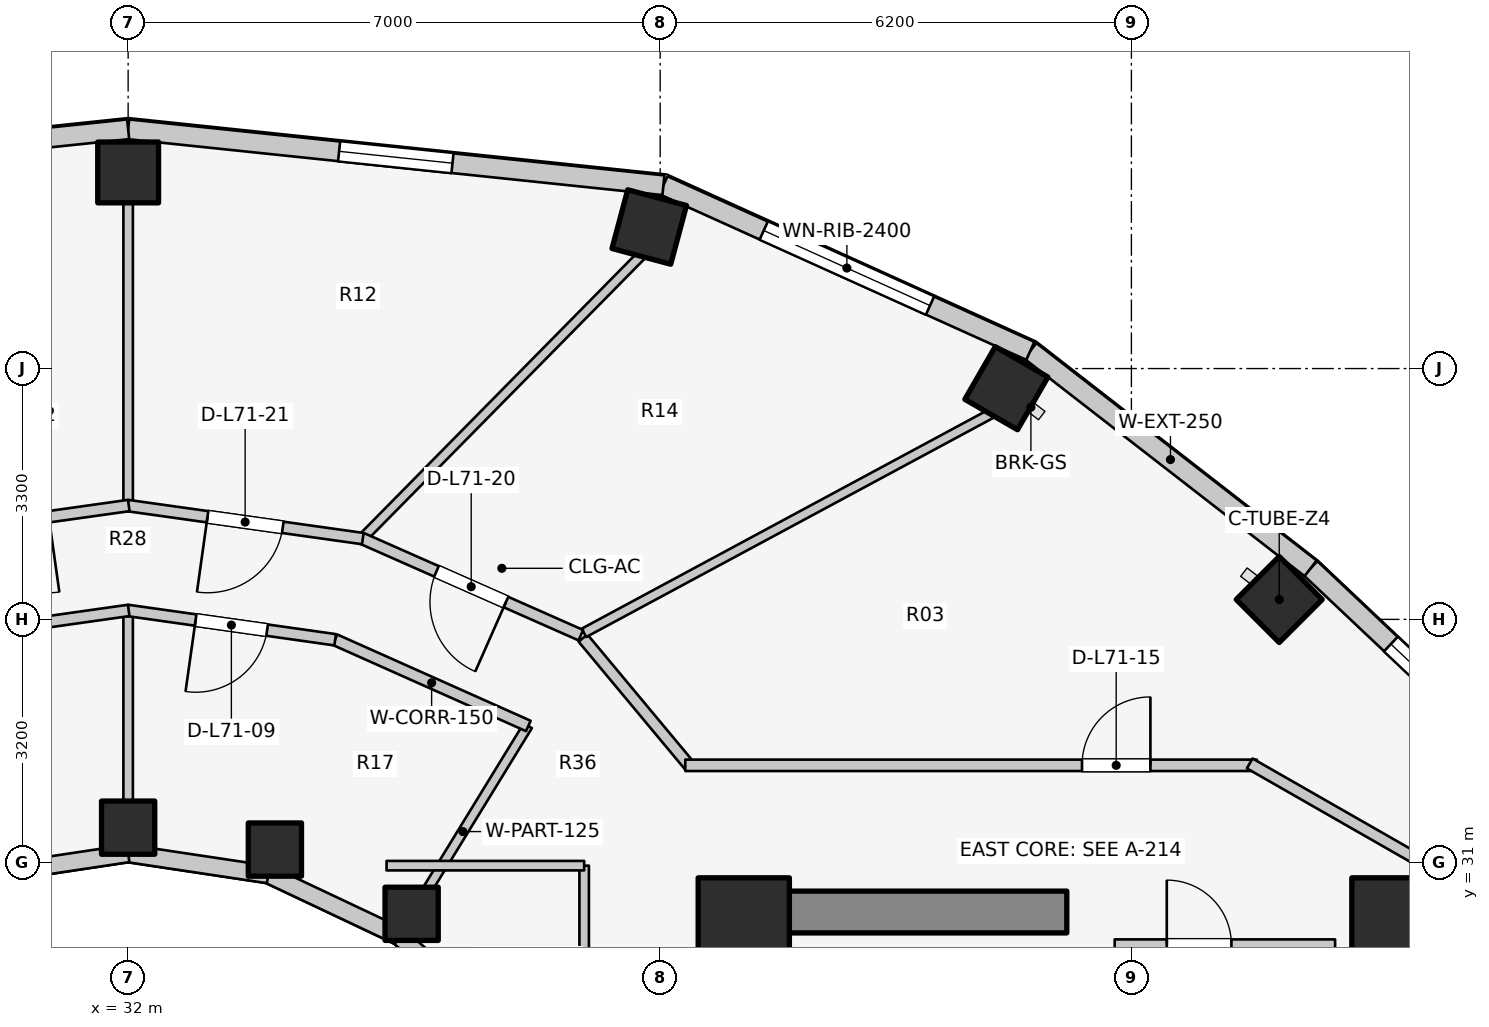
"""IFC4 building model, lengths in metres.
Left out: names, types, materials, properties, quantities, classifications, styles, units other than length and angle.
Written with IfcOpenShell. Run it as: python <this file> out.ifc"""

import sys

from ifc_helpers import new_model, si_unit, direction, frame, frame_2d, origin, origin_2d, place, context, subcontext, project, spatial, rectangle, extrude, element, fill, save


model = new_model("IFC4")
c1 = context("Model", 3, precision=1e-05, world=origin(), true_north=direction((0.0, 1.0)))
c2 = subcontext(c1, "Body", "Model", "MODEL_VIEW")
j1 = project(units=[si_unit("LENGTHUNIT", "METRE"), si_unit("PLANEANGLEUNIT", "RADIAN")], contexts=[c1])
p1 = place(None, origin())
s1 = spatial("IfcSite", under=j1, at=p1, CompositionType="ELEMENT")
p2 = place(p1, origin())
s2 = spatial("IfcBuilding", under=s1, at=p2, CompositionType="ELEMENT")
p3 = place(p2, frame((0.0, 0.0, 232.6)))
s3 = spatial("IfcBuildingStorey", under=s2, at=p3, CompositionType="ELEMENT", Elevation=232.6)
p4 = place(p3, frame((39.85, 30.35, 0.0), z_axis=(0.0, 0.0, 1.0), x_axis=(1.0, 0.0, 0.0)))
e1 = element("IfcWall", 1, at=p4, inside=s3, PredefinedType="SHEAR", context=c2, shape_type="SweptSolid", body=[
    extrude(rectangle(XDim=4.5, YDim=0.55, at=frame_2d((2.25, 0.0))), origin(), (0.0, 0.0, 1.0), 3.1),
])
for number, where, z_axis, x_axis in (
    (2, (48.7, 30.2, 0.0), (0.0, 0.0, 1.0), (1.0, 0.0, 0.0)),
    (3, (40.1, 30.2, 0.0), (0.0, 0.0, 1.0), (1.0, 0.0, 0.0)),
):
    element("IfcColumn", number, at=place(p3, frame(where, z_axis=z_axis, x_axis=x_axis)), inside=s3, PredefinedType="COLUMN", context=c2, shape_type="SweptSolid", body=[
        extrude(rectangle(XDim=1.2, YDim=1.2, at=origin_2d()), origin(), (0.0, 0.0, 1.0), 3.1),
    ])
p5 = place(p3, frame((47.145, 34.462, 0.0), z_axis=(0.0, 0.0, 1.0), x_axis=(0.707106781187, 0.707106781187, 0.0)))
e4 = element("IfcColumn", 4, at=p5, inside=s3, PredefinedType="COLUMN", context=c2, shape_type="SweptSolid", body=[
    extrude(rectangle(XDim=0.8, YDim=0.8, at=origin_2d()), origin(), (0.0, 0.0, 1.0), 3.1),
])
p6 = place(p3, frame((35.73, 30.327, 0.0), z_axis=(0.0, 0.0, 1.0), x_axis=(1.0, 0.0, 0.0)))
e5 = element("IfcColumn", 5, at=p6, inside=s3, PredefinedType="COLUMN", context=c2, shape_type="SweptSolid", body=[
    extrude(rectangle(XDim=0.7, YDim=0.7, at=origin_2d()), origin(), (0.0, 0.0, 1.0), 3.1),
])
p7 = place(p3, frame((43.555, 37.241, 0.0), z_axis=(0.0, 0.0, 1.0), x_axis=(0.5, 0.866025403784, 0.0)))
e6 = element("IfcColumn", 6, at=p7, inside=s3, PredefinedType="COLUMN", context=c2, shape_type="SweptSolid", body=[
    extrude(rectangle(XDim=0.8, YDim=0.8, at=origin_2d()), origin(), (0.0, 0.0, 1.0), 3.1),
])
p8 = place(p3, frame((33.931, 31.172, 0.0), z_axis=(0.0, 0.0, 1.0), x_axis=(1.0, 0.0, 0.0)))
e7 = element("IfcColumn", 7, at=p8, inside=s3, PredefinedType="COLUMN", context=c2, shape_type="SweptSolid", body=[
    extrude(rectangle(XDim=0.7, YDim=0.7, at=origin_2d()), origin(), (0.0, 0.0, 1.0), 3.1),
])
p9 = place(p3, frame((38.856, 39.362, 0.0), z_axis=(0.0, 0.0, 1.0), x_axis=(0.258819045103, 0.965925826289, 0.0)))
e8 = element("IfcColumn", 8, at=p9, inside=s3, PredefinedType="COLUMN", context=c2, shape_type="SweptSolid", body=[
    extrude(rectangle(XDim=0.8, YDim=0.8, at=origin_2d()), origin(), (0.0, 0.0, 1.0), 3.1),
])
p10 = place(p3, frame((32.0, 31.46, 0.0), z_axis=(0.0, 0.0, 1.0), x_axis=(1.0, 0.0, 0.0)))
e9 = element("IfcColumn", 9, at=p10, inside=s3, PredefinedType="COLUMN", context=c2, shape_type="SweptSolid", body=[
    extrude(rectangle(XDim=0.7, YDim=0.7, at=origin_2d()), origin(), (0.0, 0.0, 1.0), 3.1),
])
p11 = place(p3, frame((32.0, 40.08, 0.0), z_axis=(0.0, 0.0, 1.0), x_axis=(0.0, 1.0, 0.0)))
e10 = element("IfcColumn", 10, at=p11, inside=s3, PredefinedType="COLUMN", context=c2, shape_type="SweptSolid", body=[
    extrude(rectangle(XDim=0.8, YDim=0.8, at=origin_2d()), origin(), (0.0, 0.0, 1.0), 3.1),
])
p12 = place(p3, frame((37.035, 28.742, 0.0), z_axis=(0.0, 0.0, 1.0), x_axis=(-0.752576694707, 0.658504607869, 0.0)))
e11 = element("IfcWall", 11, at=p12, inside=s3, PredefinedType="STANDARD", context=c2, shape_type="SweptSolid", body=[
    extrude(rectangle(XDim=1.959, YDim=0.23, at=frame_2d((0.98, 0.0))), origin(), (0.0, 0.0, 1.0), 2.16),
])
p13 = place(p3, frame((35.56, 30.032, 0.0), z_axis=(0.0, 0.0, 1.0), x_axis=(-0.904179699603, 0.427152280606, 0.0)))
e12 = element("IfcWall", 12, at=p13, inside=s3, PredefinedType="STANDARD", context=c2, shape_type="SweptSolid", body=[
    extrude(rectangle(XDim=1.899, YDim=0.23, at=frame_2d((0.95, 0.0))), origin(), (0.0, 0.0, 1.0), 2.16),
])
for number, where, z_axis, x_axis in (
    (13, (33.843, 30.843, 0.0), (0.0, 0.0, 1.0), (-0.989, 0.149, 0.0)),
    (14, (32.0, 31.12, 0.0), (0.0, 0.0, 1.0), (-0.989, -0.149, 0.0)),
):
    element("IfcWall", number, at=place(p3, frame(where, z_axis=z_axis, x_axis=x_axis)), inside=s3, PredefinedType="STANDARD", context=c2, shape_type="SweptSolid", body=[
        extrude(rectangle(XDim=1.864, YDim=0.23, at=frame_2d((0.932, 0.0))), origin(), (0.0, 0.0, 1.0), 2.16),
    ])
p14 = place(p3, frame((50.761, 31.849, 0.0), z_axis=(0.0, 0.0, 1.0), x_axis=(-0.72731899451, 0.686299555752, 0.0)))
e15 = element("IfcWall", 15, at=p14, inside=s3, PredefinedType="STANDARD", context=c2, shape_type="SweptSolid", body=[
    extrude(rectangle(XDim=4.404, YDim=0.26, at=frame_2d((2.202, 0.0))), origin(), (0.0, 0.0, 1.0), 2.85),
])
p15 = place(p14, frame((1.452, 0.0, 0.75)))
e16 = element("IfcOpeningElement", 16, at=p15, cuts=e15, PredefinedType="OPENING", context=c2, shape_type="SweptSolid", body=[
    extrude(rectangle(XDim=1.5, YDim=1.6, at=frame_2d((0.75, 0.8))), frame((0.0, 0.14, 0.0), z_axis=(0.0, -1.0, 0.0), x_axis=(1.0, 0.0, 0.0)), (0.0, 0.0, 1.0), 0.28),
])
p16 = place(p3, frame((47.558, 34.872, 0.0), z_axis=(0.0, 0.0, 1.0), x_axis=(-0.790126214723, 0.612944177563, 0.0)))
e17 = element("IfcWall", 17, at=p16, inside=s3, PredefinedType="STANDARD", context=c2, shape_type="SweptSolid", body=[
    extrude(rectangle(XDim=4.667, YDim=0.26, at=frame_2d((2.333, 0.0))), origin(), (0.0, 0.0, 1.0), 2.85),
])
p17 = place(p3, frame((43.87, 37.733, 0.0), z_axis=(0.0, 0.0, 1.0), x_axis=(-0.911427484938, 0.411460738952, 0.0)))
e18 = element("IfcWall", 18, at=p17, inside=s3, PredefinedType="STANDARD", context=c2, shape_type="SweptSolid", body=[
    extrude(rectangle(XDim=5.296, YDim=0.26, at=frame_2d((2.648, 0.0))), origin(), (0.0, 0.0, 1.0), 2.85),
])
p18 = place(p17, frame((1.448, 0.0, 0.75)))
e19 = element("IfcOpeningElement", 19, at=p18, cuts=e18, PredefinedType="OPENING", context=c2, shape_type="SweptSolid", body=[
    extrude(rectangle(XDim=2.4, YDim=1.7, at=frame_2d((1.2, 0.85))), frame((0.0, 0.14, 0.0), z_axis=(0.0, -1.0, 0.0), x_axis=(1.0, 0.0, 0.0)), (0.0, 0.0, 1.0), 0.28),
])
p19 = place(p3, frame((39.043, 39.912, 0.0), z_axis=(0.0, 0.0, 1.0), x_axis=(-0.994582822721, 0.103947144014, 0.0)))
e20 = element("IfcWall", 20, at=p19, inside=s3, PredefinedType="STANDARD", context=c2, shape_type="SweptSolid", body=[
    extrude(rectangle(XDim=7.081, YDim=0.26, at=frame_2d((3.541, 0.0))), origin(), (0.0, 0.0, 1.0), 2.85),
])
p20 = place(p19, frame((2.791, 0.0, 0.75)))
e21 = element("IfcOpeningElement", 21, at=p20, cuts=e20, PredefinedType="OPENING", context=c2, shape_type="SweptSolid", body=[
    extrude(rectangle(XDim=1.5, YDim=1.6, at=frame_2d((0.75, 0.8))), frame((0.0, 0.14, 0.0), z_axis=(0.0, -1.0, 0.0), x_axis=(1.0, 0.0, 0.0)), (0.0, 0.0, 1.0), 0.28),
])
p21 = place(p3, frame((32.0, 40.648, 0.0), z_axis=(0.0, 0.0, 1.0), x_axis=(-0.994582822721, -0.103947144014, 0.0)))
e22 = element("IfcWall", 22, at=p21, inside=s3, PredefinedType="STANDARD", context=c2, shape_type="SweptSolid", body=[
    extrude(rectangle(XDim=7.081, YDim=0.26, at=frame_2d((3.541, 0.0))), origin(), (0.0, 0.0, 1.0), 2.85),
])
p22 = place(p21, frame((2.791, 0.0, 0.75)))
e23 = element("IfcOpeningElement", 23, at=p22, cuts=e22, PredefinedType="OPENING", context=c2, shape_type="SweptSolid", body=[
    extrude(rectangle(XDim=1.5, YDim=1.6, at=frame_2d((0.75, 0.8))), frame((0.0, 0.14, 0.0), z_axis=(0.0, -1.0, 0.0), x_axis=(1.0, 0.0, 0.0)), (0.0, 0.0, 1.0), 0.28),
])
p23 = place(p3, frame((44.98, 29.92, 0.0), z_axis=(0.0, 0.0, 1.0), x_axis=(1.0, 0.0, 0.0)))
e24 = element("IfcWall", 24, at=p23, inside=s3, PredefinedType="PLUMBINGWALL", context=c2, shape_type="SweptSolid", body=[
    extrude(rectangle(XDim=2.9, YDim=0.14, at=frame_2d((1.45, 0.0))), origin(), (0.0, 0.0, 1.0), 2.855),
])
p24 = place(p23, frame((0.686, 0.0, 0.0)))
e25 = element("IfcOpeningElement", 25, at=p24, cuts=e24, PredefinedType="OPENING", context=c2, shape_type="SweptSolid", body=[
    extrude(rectangle(XDim=0.85, YDim=2.05, at=frame_2d((0.425, 1.025))), frame((0.0, 0.08, 0.0), z_axis=(0.0, -1.0, 0.0), x_axis=(1.0, 0.0, 0.0)), (0.0, 0.0, 1.0), 0.16),
])
p25 = place(p3, frame((35.55, 30.015, 0.0), z_axis=(0.0, 0.0, 1.0), x_axis=(0.522763432117, 0.852477796802, 0.0)))
e26 = element("IfcWall", 26, at=p25, inside=s3, PredefinedType="PARTITIONING", context=c2, shape_type="SweptSolid", body=[
    extrude(rectangle(XDim=3.269, YDim=0.125, at=frame_2d((1.635, 0.0))), origin(), (0.0, 0.0, 1.0), 2.376),
])
p26 = place(p3, frame((32.0, 31.1, 0.0), z_axis=(0.0, 0.0, 1.0), x_axis=(0.0, 1.0, 0.0)))
e27 = element("IfcWall", 27, at=p26, inside=s3, PredefinedType="PARTITIONING", context=c2, shape_type="SweptSolid", body=[
    extrude(rectangle(XDim=3.218, YDim=0.125, at=frame_2d((1.609, 0.0))), origin(), (0.0, 0.0, 1.0), 2.376),
])
p27 = place(p3, frame((37.265, 32.798, 0.0), z_axis=(0.0, 0.0, 1.0), x_axis=(-0.913254317828, 0.407389924971, 0.0)))
e28 = element("IfcWall", 28, at=p27, inside=s3, PredefinedType="PARTITIONING", context=c2, shape_type="SweptSolid", body=[
    extrude(rectangle(XDim=2.787, YDim=0.15, at=frame_2d((1.393, 0.0))), origin(), (0.0, 0.0, 1.0), 2.376),
])
p28 = place(p3, frame((34.724, 33.932, 0.0), z_axis=(0.0, 0.0, 1.0), x_axis=(-0.990150268487, 0.140008734782, 0.0)))
e29 = element("IfcWall", 29, at=p28, inside=s3, PredefinedType="PARTITIONING", context=c2, shape_type="SweptSolid", body=[
    extrude(rectangle(XDim=2.759, YDim=0.15, at=frame_2d((1.379, 0.0))), origin(), (0.0, 0.0, 1.0), 2.376),
])
p29 = place(p28, frame((0.904, 0.0, 0.0)))
e30 = element("IfcOpeningElement", 30, at=p29, cuts=e29, PredefinedType="OPENING", context=c2, shape_type="SweptSolid", body=[
    extrude(rectangle(XDim=0.95, YDim=2.1, at=frame_2d((0.475, 1.05))), frame((0.0, 0.085, 0.0), z_axis=(0.0, -1.0, 0.0), x_axis=(1.0, 0.0, 0.0)), (0.0, 0.0, 1.0), 0.17),
])
p30 = place(p3, frame((32.007, 34.318, 0.0), z_axis=(0.0, 0.0, 1.0), x_axis=(-0.990150268487, -0.140008734782, 0.0)))
e31 = element("IfcWall", 31, at=p30, inside=s3, PredefinedType="PARTITIONING", context=c2, shape_type="SweptSolid", body=[
    extrude(rectangle(XDim=2.759, YDim=0.15, at=frame_2d((1.379, 0.0))), origin(), (0.0, 0.0, 1.0), 2.376),
])
p31 = place(p3, frame((38.0, 25.8, 0.0), z_axis=(0.0, 0.0, 1.0), x_axis=(0.0, 1.0, 0.0)))
e32 = element("IfcWall", 32, at=p31, inside=s3, PredefinedType="PARTITIONING", context=c2, shape_type="SweptSolid", body=[
    extrude(rectangle(XDim=5.16, YDim=0.125, at=frame_2d((2.58, 0.0))), origin(), (0.0, 0.0, 1.0), 2.232),
])
p32 = place(p3, frame((35.4, 30.96, 0.0), z_axis=(0.0, 0.0, 1.0), x_axis=(1.0, 0.0, 0.0)))
e33 = element("IfcWall", 33, at=p32, inside=s3, PredefinedType="PARTITIONING", context=c2, shape_type="SweptSolid", body=[
    extrude(rectangle(XDim=2.6, YDim=0.125, at=frame_2d((1.3, 0.0))), origin(), (0.0, 0.0, 1.0), 2.376),
])
p33 = place(p3, frame((37.984, 33.955, 0.0), z_axis=(0.0, 0.0, 1.0), x_axis=(0.64030392053, -0.76812166312, 0.0)))
e34 = element("IfcWall", 34, at=p33, inside=s3, PredefinedType="PARTITIONING", context=c2, shape_type="SweptSolid", body=[
    extrude(rectangle(XDim=2.21, YDim=0.15, at=frame_2d((1.105, 0.0))), origin(), (0.0, 0.0, 1.0), 2.376),
])
p34 = place(p3, frame((39.33, 32.28, 0.0), z_axis=(0.0, 0.0, 1.0), x_axis=(1.0, 0.0, 0.0)))
e35 = element("IfcWall", 35, at=p34, inside=s3, PredefinedType="PARTITIONING", context=c2, shape_type="SweptSolid", body=[
    extrude(rectangle(XDim=7.52, YDim=0.15, at=frame_2d((3.76, 0.0))), origin(), (0.0, 0.0, 1.0), 2.376),
])
p35 = place(p34, frame((5.22, 0.0, 0.0)))
e36 = element("IfcOpeningElement", 36, at=p35, cuts=e35, PredefinedType="OPENING", context=c2, shape_type="SweptSolid", body=[
    extrude(rectangle(XDim=0.9, YDim=2.1, at=frame_2d((0.45, 1.05))), frame((0.0, 0.085, 0.0), z_axis=(0.0, -1.0, 0.0), x_axis=(1.0, 0.0, 0.0)), (0.0, 0.0, 1.0), 0.17),
])
p36 = place(p3, frame((46.757, 32.305, 0.0), z_axis=(0.0, 0.0, 1.0), x_axis=(0.867991349648, -0.496579315857, 0.0)))
e37 = element("IfcWall", 37, at=p36, inside=s3, PredefinedType="PARTITIONING", context=c2, shape_type="SweptSolid", body=[
    extrude(rectangle(XDim=2.567, YDim=0.15, at=frame_2d((1.283, 0.0))), origin(), (0.0, 0.0, 1.0), 2.22),
])
p37 = place(p3, frame((37.997, 34.023, 0.0), z_axis=(0.0, 0.0, 1.0), x_axis=(0.880531534665, 0.473987569943, 0.0)))
e38 = element("IfcWall", 38, at=p37, inside=s3, PredefinedType="PARTITIONING", context=c2, shape_type="SweptSolid", body=[
    extrude(rectangle(XDim=6.096, YDim=0.125, at=frame_2d((3.048, 0.0))), origin(), (0.0, 0.0, 1.0), 2.376),
])
p38 = place(p3, frame((35.118, 35.304, 0.0), z_axis=(0.0, 0.0, 1.0), x_axis=(0.702191571271, 0.711988059756, 0.0)))
e39 = element("IfcWall", 39, at=p38, inside=s3, PredefinedType="PARTITIONING", context=c2, shape_type="SweptSolid", body=[
    extrude(rectangle(XDim=5.184, YDim=0.125, at=frame_2d((2.592, 0.0))), origin(), (0.0, 0.0, 1.0), 2.376),
])
p39 = place(p3, frame((32.0, 35.753, 0.0), z_axis=(0.0, 0.0, 1.0), x_axis=(0.0, 1.0, 0.0)))
e40 = element("IfcWall", 40, at=p39, inside=s3, PredefinedType="PARTITIONING", context=c2, shape_type="SweptSolid", body=[
    extrude(rectangle(XDim=3.947, YDim=0.125, at=frame_2d((1.974, 0.0))), origin(), (0.0, 0.0, 1.0), 2.376),
])
p40 = place(p3, frame((37.956, 33.992, 0.0), z_axis=(0.0, 0.0, 1.0), x_axis=(-0.914642679993, 0.404263240891, 0.0)))
e41 = element("IfcWall", 41, at=p40, inside=s3, PredefinedType="PARTITIONING", context=c2, shape_type="SweptSolid", body=[
    extrude(rectangle(XDim=3.154, YDim=0.15, at=frame_2d((1.577, 0.0))), origin(), (0.0, 0.0, 1.0), 2.376),
])
p41 = place(p40, frame((1.077, 0.0, 0.0)))
e42 = element("IfcOpeningElement", 42, at=p41, cuts=e41, PredefinedType="OPENING", context=c2, shape_type="SweptSolid", body=[
    extrude(rectangle(XDim=1.0, YDim=2.1, at=frame_2d((0.5, 1.05))), frame((0.0, 0.085, 0.0), z_axis=(0.0, -1.0, 0.0), x_axis=(1.0, 0.0, 0.0)), (0.0, 0.0, 1.0), 0.17),
])
p42 = place(p3, frame((35.087, 35.263, 0.0), z_axis=(0.0, 0.0, 1.0), x_axis=(-0.990268690673, 0.139168675614, 0.0)))
e43 = element("IfcWall", 43, at=p42, inside=s3, PredefinedType="PARTITIONING", context=c2, shape_type="SweptSolid", body=[
    extrude(rectangle(XDim=3.126, YDim=0.15, at=frame_2d((1.563, 0.0))), origin(), (0.0, 0.0, 1.0), 2.376),
])
p43 = place(p42, frame((1.063, 0.0, 0.0)))
e44 = element("IfcOpeningElement", 44, at=p43, cuts=e43, PredefinedType="OPENING", context=c2, shape_type="SweptSolid", body=[
    extrude(rectangle(XDim=1.0, YDim=2.1, at=frame_2d((0.5, 1.05))), frame((0.0, 0.085, 0.0), z_axis=(0.0, -1.0, 0.0), x_axis=(1.0, 0.0, 0.0)), (0.0, 0.0, 1.0), 0.17),
])
p44 = place(p3, frame((32.008, 35.698, 0.0), z_axis=(0.0, 0.0, 1.0), x_axis=(-0.990268690673, -0.139168675614, 0.0)))
e45 = element("IfcWall", 45, at=p44, inside=s3, PredefinedType="PARTITIONING", context=c2, shape_type="SweptSolid", body=[
    extrude(rectangle(XDim=3.126, YDim=0.15, at=frame_2d((1.563, 0.0))), origin(), (0.0, 0.0, 1.0), 2.376),
])
p45 = place(p44, frame((1.063, 0.0, 0.0)))
e46 = element("IfcOpeningElement", 46, at=p45, cuts=e45, PredefinedType="OPENING", context=c2, shape_type="SweptSolid", body=[
    extrude(rectangle(XDim=1.0, YDim=2.1, at=frame_2d((0.5, 1.05))), frame((0.0, 0.085, 0.0), z_axis=(0.0, -1.0, 0.0), x_axis=(1.0, 0.0, 0.0)), (0.0, 0.0, 1.0), 0.17),
])
p46 = place(p15, origin())
e47 = element("IfcWindow", 47, at=p46, inside=s3, PartitioningType="SINGLE_PANEL", PredefinedType="WINDOW", context=c2, shape_type="SweptSolid", body=[
    extrude(rectangle(XDim=1.5, YDim=1.6, at=frame_2d((0.75, 0.8))), frame((0.0, 0.03, 0.0), z_axis=(0.0, -1.0, 0.0), x_axis=(1.0, 0.0, 0.0)), (0.0, 0.0, 1.0), 0.06),
])
fill(e16, e47)
p47 = place(p18, origin())
e48 = element("IfcWindow", 48, at=p47, inside=s3, PartitioningType="SINGLE_PANEL", PredefinedType="WINDOW", context=c2, shape_type="SweptSolid", body=[
    extrude(rectangle(XDim=2.4, YDim=1.7, at=frame_2d((1.2, 0.85))), frame((0.0, 0.03, 0.0), z_axis=(0.0, -1.0, 0.0), x_axis=(1.0, 0.0, 0.0)), (0.0, 0.0, 1.0), 0.06),
])
fill(e19, e48)
p48 = place(p20, origin())
e49 = element("IfcWindow", 49, at=p48, inside=s3, PartitioningType="SINGLE_PANEL", PredefinedType="WINDOW", context=c2, shape_type="SweptSolid", body=[
    extrude(rectangle(XDim=1.5, YDim=1.6, at=frame_2d((0.75, 0.8))), frame((0.0, 0.03, 0.0), z_axis=(0.0, -1.0, 0.0), x_axis=(1.0, 0.0, 0.0)), (0.0, 0.0, 1.0), 0.06),
])
fill(e21, e49)
p49 = place(p24, origin())
e50 = element("IfcDoor", 50, at=p49, inside=s3, OperationType="SINGLE_SWING_LEFT", PredefinedType="DOOR", context=c2, shape_type="SweptSolid", body=[
    extrude(rectangle(XDim=0.85, YDim=2.05, at=frame_2d((0.425, 1.025))), frame((0.0, 0.025, 0.0), z_axis=(0.0, -1.0, 0.0), x_axis=(1.0, 0.0, 0.0)), (0.0, 0.0, 1.0), 0.05),
])
fill(e25, e50)
p50 = place(p29, origin())
e51 = element("IfcDoor", 51, at=p50, inside=s3, OperationType="SINGLE_SWING_RIGHT", PredefinedType="DOOR", context=c2, shape_type="SweptSolid", body=[
    extrude(rectangle(XDim=0.95, YDim=2.1, at=frame_2d((0.475, 1.05))), frame((0.0, 0.025, 0.0), z_axis=(0.0, -1.0, 0.0), x_axis=(1.0, 0.0, 0.0)), (0.0, 0.0, 1.0), 0.05),
])
fill(e30, e51)
p51 = place(p35, origin())
e52 = element("IfcDoor", 52, at=p51, inside=s3, OperationType="SINGLE_SWING_RIGHT", PredefinedType="DOOR", context=c2, shape_type="SweptSolid", body=[
    extrude(rectangle(XDim=0.9, YDim=2.1, at=frame_2d((0.45, 1.05))), frame((0.0, 0.025, 0.0), z_axis=(0.0, -1.0, 0.0), x_axis=(1.0, 0.0, 0.0)), (0.0, 0.0, 1.0), 0.05),
])
fill(e36, e52)
p52 = place(p41, origin())
e53 = element("IfcDoor", 53, at=p52, inside=s3, OperationType="SINGLE_SWING_LEFT", PredefinedType="DOOR", context=c2, shape_type="SweptSolid", body=[
    extrude(rectangle(XDim=1.0, YDim=2.1, at=frame_2d((0.5, 1.05))), frame((0.0, 0.025, 0.0), z_axis=(0.0, -1.0, 0.0), x_axis=(1.0, 0.0, 0.0)), (0.0, 0.0, 1.0), 0.05),
])
fill(e42, e53)
p53 = place(p43, origin())
e54 = element("IfcDoor", 54, at=p53, inside=s3, OperationType="SINGLE_SWING_RIGHT", PredefinedType="DOOR", context=c2, shape_type="SweptSolid", body=[
    extrude(rectangle(XDim=1.0, YDim=2.1, at=frame_2d((0.5, 1.05))), frame((0.0, 0.025, 0.0), z_axis=(0.0, -1.0, 0.0), x_axis=(1.0, 0.0, 0.0)), (0.0, 0.0, 1.0), 0.05),
])
fill(e44, e54)
save(model, sys.argv[1])
